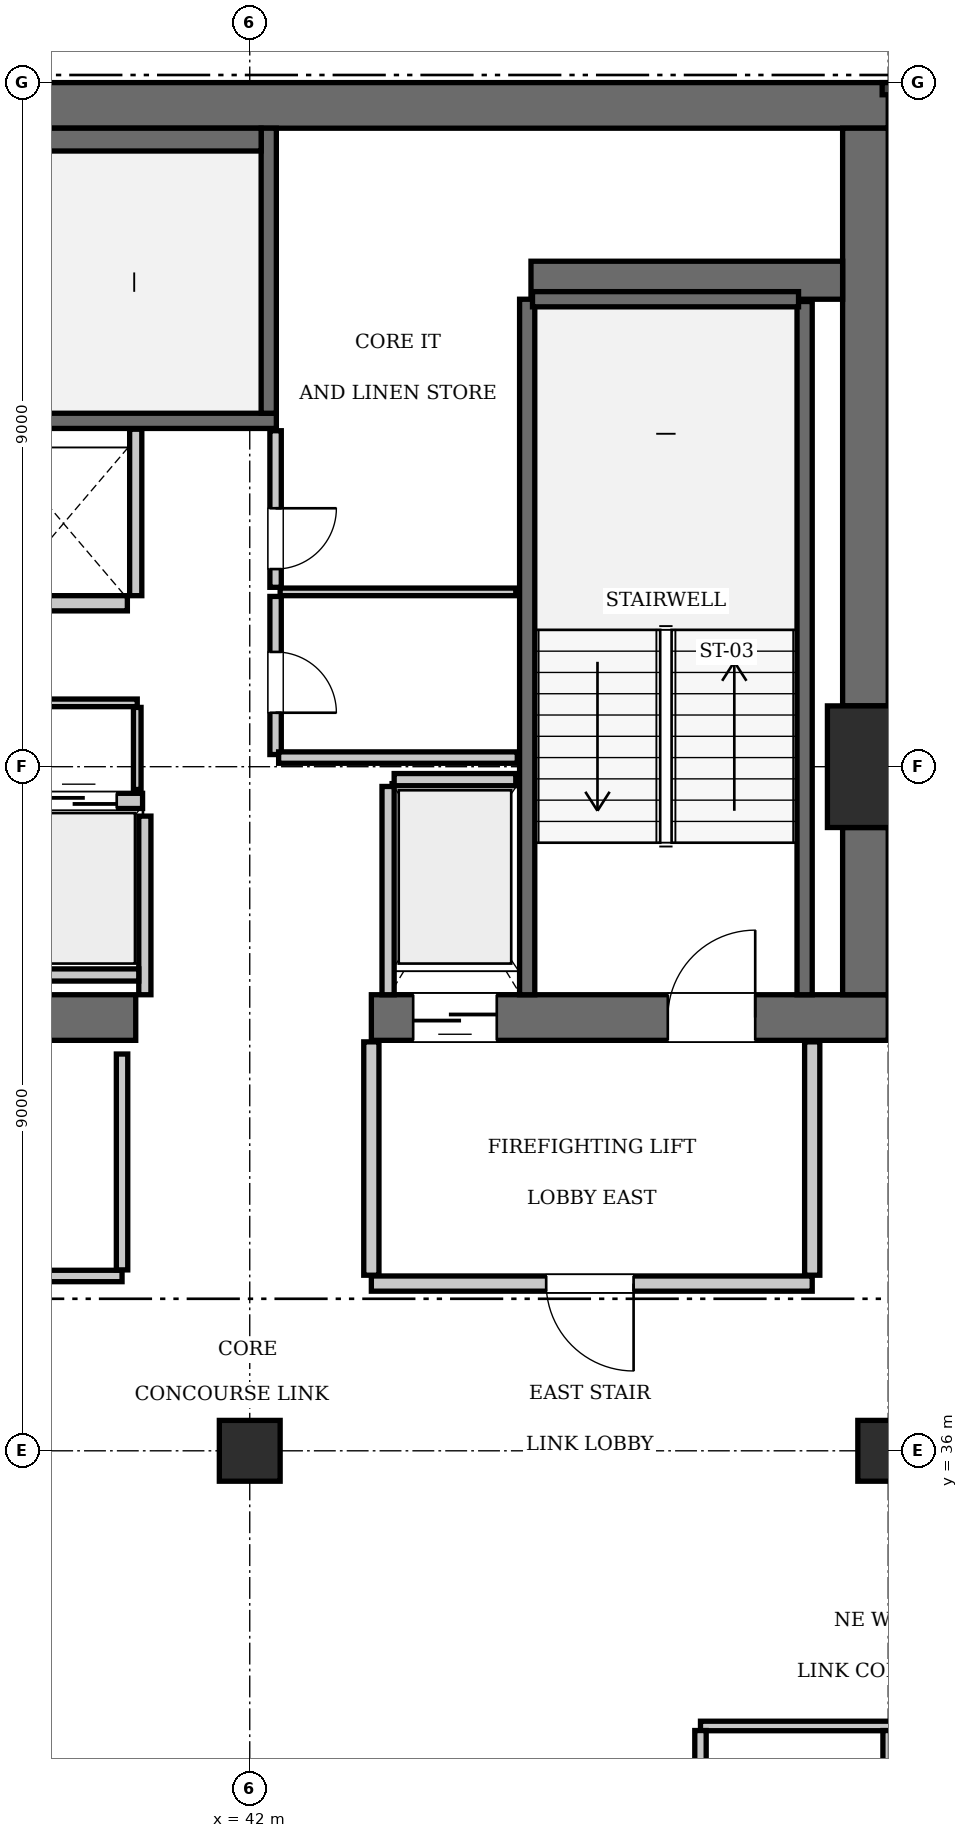
"""IFC4 building model, lengths in metres.
Left out: names, types, materials, properties, quantities, classifications, styles, units other than length and angle.
Written with IfcOpenShell. Run it as: python <this file> out.ifc"""

import sys

from ifc_helpers import new_model, si_unit, direction, frame, frame_2d, origin, origin_2d, place, context, subcontext, project, spatial, rectangle, extrude, element, fill, save


model = new_model("IFC4")
c1 = context("Model", 3, precision=1e-05, world=origin(), true_north=direction((0.0, 1.0)))
c2 = subcontext(c1, "Body", "Model", "MODEL_VIEW")
j1 = project(units=[si_unit("LENGTHUNIT", "METRE"), si_unit("PLANEANGLEUNIT", "RADIAN")], contexts=[c1])
p1 = place(None, origin())
s1 = spatial("IfcSite", under=j1, at=p1, CompositionType="ELEMENT")
p2 = place(p1, origin())
s2 = spatial("IfcBuilding", under=s1, at=p2, CompositionType="ELEMENT")
p3 = place(p2, frame((0.0, 0.0, 247.1)))
s3 = spatial("IfcBuildingStorey", under=s2, at=p3, CompositionType="ELEMENT", Elevation=247.1)
p4 = place(p3, frame((50.4, 45.0, 0.0), z_axis=(0.0, 0.0, 1.0), x_axis=(1.0, 0.0, 0.0)))
e1 = element("IfcColumn", 1, at=p4, inside=s3, PredefinedType="COLUMN", context=c2, shape_type="SweptSolid", body=[
    extrude(rectangle(XDim=1.6, YDim=1.6, at=origin_2d()), origin(), (0.0, 0.0, 1.0), 3.85),
])
p5 = place(p3, frame((25.2, 53.7, 0.0), z_axis=(0.0, 0.0, 1.0), x_axis=(1.0, 0.0, 0.0)))
e2 = element("IfcWall", 2, at=p5, inside=s3, PredefinedType="SHEAR", context=c2, shape_type="SweptSolid", body=[
    extrude(rectangle(XDim=25.2, YDim=0.6, at=frame_2d((12.6, 0.0))), origin(), (0.0, 0.0, 1.0), 3.85),
])
p6 = place(p3, frame((35.1, 41.7, 0.0), z_axis=(0.0, 0.0, 1.0), x_axis=(1.0, 0.0, 0.0)))
e3 = element("IfcWall", 3, at=p6, inside=s3, PredefinedType="SHEAR", context=c2, shape_type="SweptSolid", body=[
    extrude(rectangle(XDim=5.4, YDim=0.6, at=frame_2d((2.7, 0.0))), origin(), (0.0, 0.0, 1.0), 3.85),
])
p7 = place(p3, frame((43.6, 41.7, 0.0), z_axis=(0.0, 0.0, 1.0), x_axis=(1.0, 0.0, 0.0)))
e4 = element("IfcWall", 4, at=p7, inside=s3, PredefinedType="SHEAR", context=c2, shape_type="SweptSolid", body=[
    extrude(rectangle(XDim=6.8, YDim=0.6, at=frame_2d((3.4, 0.0))), origin(), (0.0, 0.0, 1.0), 3.85),
])
p8 = place(p7, frame((3.9, 0.0, 0.0)))
e5 = element("IfcOpeningElement", 5, at=p8, cuts=e4, PredefinedType="OPENING", context=c2, shape_type="SweptSolid", body=[
    extrude(rectangle(XDim=1.15, YDim=2.15, at=frame_2d((0.575, 1.075))), frame((0.0, 0.31, 0.0), z_axis=(0.0, -1.0, 0.0), x_axis=(1.0, 0.0, 0.0)), (0.0, 0.0, 1.0), 0.62),
])
p9 = place(p7, frame((0.55, 0.0, 0.0)))
e6 = element("IfcOpeningElement", 6, at=p9, cuts=e4, PredefinedType="OPENING", context=c2, shape_type="SweptSolid", body=[
    extrude(rectangle(XDim=1.1, YDim=2.2, at=frame_2d((0.55, 1.1))), frame((0.0, 0.31, 0.0), z_axis=(0.0, -1.0, 0.0), x_axis=(1.0, 0.0, 0.0)), (0.0, 0.0, 1.0), 0.62),
])
p10 = place(p3, frame((50.1, 42.0, 0.0), z_axis=(0.0, 0.0, 1.0), x_axis=(0.0, 1.0, 0.0)))
e7 = element("IfcWall", 7, at=p10, inside=s3, PredefinedType="SHEAR", context=c2, shape_type="SweptSolid", body=[
    extrude(rectangle(XDim=2.2, YDim=0.6, at=frame_2d((1.1, 0.0))), origin(), (0.0, 0.0, 1.0), 3.85),
])
p11 = place(p3, frame((50.1, 45.8, 0.0), z_axis=(0.0, 0.0, 1.0), x_axis=(0.0, 1.0, 0.0)))
e8 = element("IfcWall", 8, at=p11, inside=s3, PredefinedType="SHEAR", context=c2, shape_type="SweptSolid", body=[
    extrude(rectangle(XDim=7.6, YDim=0.6, at=frame_2d((3.8, 0.0))), origin(), (0.0, 0.0, 1.0), 3.85),
])
p12 = place(p3, frame((45.7, 51.4, 0.0), z_axis=(0.0, 0.0, 1.0), x_axis=(1.0, 0.0, 0.0)))
e9 = element("IfcWall", 9, at=p12, inside=s3, PredefinedType="SHEAR", context=c2, shape_type="SweptSolid", body=[
    extrude(rectangle(XDim=4.1, YDim=0.5, at=frame_2d((2.05, 0.0))), origin(), (0.0, 0.0, 1.0), 3.85),
])
for number, where, z_axis, x_axis in (
    (10, (42.0, 36.0, 0.0), (0.0, 0.0, 1.0), (1.0, 0.0, 0.0)),
    (11, (50.4, 36.0, 0.0), (0.0, 0.0, 1.0), (1.0, 0.0, 0.0)),
):
    element("IfcColumn", number, at=place(p3, frame(where, z_axis=z_axis, x_axis=x_axis)), inside=s3, PredefinedType="COLUMN", context=c2, shape_type="SweptSolid", body=[
        extrude(rectangle(XDim=0.8, YDim=0.8, at=origin_2d()), origin(), (0.0, 0.0, 1.0), 3.85),
    ])
p13 = place(p3, frame((33.25, 49.55, 0.0), z_axis=(0.0, 0.0, 1.0), x_axis=(1.0, 0.0, 0.0)))
e12 = element("IfcWall", 12, at=p13, inside=s3, PredefinedType="SOLIDWALL", context=c2, shape_type="SweptSolid", body=[
    extrude(rectangle(XDim=9.1, YDim=0.2, at=frame_2d((4.55, 0.0))), origin(), (0.0, 0.0, 1.0), 3.61),
])
p14 = place(p3, frame((42.25, 49.65, 0.0), z_axis=(0.0, 0.0, 1.0), x_axis=(0.0, 1.0, 0.0)))
e13 = element("IfcWall", 13, at=p14, inside=s3, PredefinedType="SOLIDWALL", context=c2, shape_type="SweptSolid", body=[
    extrude(rectangle(XDim=3.75, YDim=0.2, at=frame_2d((1.875, 0.0))), origin(), (0.0, 0.0, 1.0), 3.61),
])
p15 = place(p3, frame((33.45, 53.25, 0.0), z_axis=(0.0, 0.0, 1.0), x_axis=(1.0, 0.0, 0.0)))
e14 = element("IfcWall", 14, at=p15, inside=s3, PredefinedType="SOLIDWALL", context=c2, shape_type="SweptSolid", body=[
    extrude(rectangle(XDim=8.7, YDim=0.3, at=frame_2d((4.35, 0.0))), origin(), (0.0, 0.0, 1.0), 3.61),
])
p16 = place(p3, frame((45.65, 42.0, 0.0), z_axis=(0.0, 0.0, 1.0), x_axis=(0.0, 1.0, 0.0)))
e15 = element("IfcWall", 15, at=p16, inside=s3, PredefinedType="SOLIDWALL", context=c2, shape_type="SweptSolid", body=[
    extrude(rectangle(XDim=9.15, YDim=0.2, at=frame_2d((4.575, 0.0))), origin(), (0.0, 0.0, 1.0), 3.61),
])
p17 = place(p3, frame((49.3, 42.0, 0.0), z_axis=(0.0, 0.0, 1.0), x_axis=(0.0, 1.0, 0.0)))
e16 = element("IfcWall", 16, at=p17, inside=s3, PredefinedType="SOLIDWALL", context=c2, shape_type="SweptSolid", body=[
    extrude(rectangle(XDim=9.12, YDim=0.2, at=frame_2d((4.56, 0.0))), origin(), (0.0, 0.0, 1.0), 3.61),
])
p18 = place(p3, frame((45.72, 51.15, 0.0), z_axis=(0.0, 0.0, 1.0), x_axis=(1.0, 0.0, 0.0)))
e17 = element("IfcWall", 17, at=p18, inside=s3, PredefinedType="SOLIDWALL", context=c2, shape_type="SweptSolid", body=[
    extrude(rectangle(XDim=3.5, YDim=0.2, at=frame_2d((1.75, 0.0))), origin(), (0.0, 0.0, 1.0), 3.61),
])
p19 = place(p3, frame((38.91, 44.55, 0.0), z_axis=(0.0, 0.0, 1.0), x_axis=(1.0, 0.0, 0.0)))
e18 = element("IfcWall", 18, at=p19, inside=s3, PredefinedType="SOLIDWALL", context=c2, shape_type="SweptSolid", body=[
    extrude(rectangle(XDim=1.68, YDim=0.2, at=frame_2d((0.84, 0.0))), origin(), (0.0, 0.0, 1.0), 3.61),
])
p20 = place(p19, frame((0.34, 0.0, 0.0)))
e19 = element("IfcOpeningElement", 19, at=p20, cuts=e18, PredefinedType="OPENING", context=c2, shape_type="SweptSolid", body=[
    extrude(rectangle(XDim=1.0, YDim=2.15, at=frame_2d((0.5, 1.075))), frame((0.0, 0.11, 0.0), z_axis=(0.0, -1.0, 0.0), x_axis=(1.0, 0.0, 0.0)), (0.0, 0.0, 1.0), 0.22),
])
p21 = place(p3, frame((38.71, 47.15, 0.0), z_axis=(0.0, 0.0, 1.0), x_axis=(1.0, 0.0, 0.0)))
e20 = element("IfcWall", 20, at=p21, inside=s3, PredefinedType="SOLIDWALL", context=c2, shape_type="SweptSolid", body=[
    extrude(rectangle(XDim=1.68, YDim=0.2, at=frame_2d((0.84, 0.0))), origin(), (0.0, 0.0, 1.0), 3.61),
])
p22 = place(p3, frame((43.9, 44.83, 0.0), z_axis=(0.0, 0.0, 1.0), x_axis=(1.0, 0.0, 0.0)))
e21 = element("IfcWall", 21, at=p22, inside=s3, PredefinedType="SOLIDWALL", context=c2, shape_type="SweptSolid", body=[
    extrude(rectangle(XDim=1.6, YDim=0.16, at=frame_2d((0.8, 0.0))), origin(), (0.0, 0.0, 1.0), 3.61),
])
p23 = place(p3, frame((43.82, 42.0, 0.0), z_axis=(0.0, 0.0, 1.0), x_axis=(0.0, 1.0, 0.0)))
e22 = element("IfcWall", 22, at=p23, inside=s3, PredefinedType="SOLIDWALL", context=c2, shape_type="SweptSolid", body=[
    extrude(rectangle(XDim=2.74, YDim=0.16, at=frame_2d((1.37, 0.0))), origin(), (0.0, 0.0, 1.0), 3.61),
])
p24 = place(p3, frame((40.62, 42.0, 0.0), z_axis=(0.0, 0.0, 1.0), x_axis=(0.0, 1.0, 0.0)))
e23 = element("IfcWall", 23, at=p24, inside=s3, PredefinedType="SOLIDWALL", context=c2, shape_type="SweptSolid", body=[
    extrude(rectangle(XDim=2.35, YDim=0.16, at=frame_2d((1.175, 0.0))), origin(), (0.0, 0.0, 1.0), 3.61),
])
p25 = place(p3, frame((35.52, 42.26, 0.0), z_axis=(0.0, 0.0, 1.0), x_axis=(1.0, 0.0, 0.0)))
e24 = element("IfcWall", 24, at=p25, inside=s3, PredefinedType="SOLIDWALL", context=c2, shape_type="SweptSolid", body=[
    extrude(rectangle(XDim=5.02, YDim=0.16, at=frame_2d((2.51, 0.0))), origin(), (0.0, 0.0, 1.0), 3.61),
])
p26 = place(p3, frame((40.5, 47.25, 0.0), z_axis=(0.0, 0.0, 1.0), x_axis=(0.0, 1.0, 0.0)))
e25 = element("IfcWall", 25, at=p26, inside=s3, PredefinedType="SOLIDWALL", context=c2, shape_type="SweptSolid", body=[
    extrude(rectangle(XDim=2.19, YDim=0.16, at=frame_2d((1.095, 0.0))), origin(), (0.0, 0.0, 1.0), 3.61),
])
p27 = place(p3, frame((43.6, 38.2, 0.0), z_axis=(0.0, 0.0, 1.0), x_axis=(1.0, 0.0, 0.0)))
e26 = element("IfcWall", 26, at=p27, inside=s3, PredefinedType="PARTITIONING", context=c2, shape_type="SweptSolid", body=[
    extrude(rectangle(XDim=5.8, YDim=0.2, at=frame_2d((2.9, 0.0))), origin(), (0.0, 0.0, 1.0), 3.61),
])
p28 = place(p27, frame((2.3, 0.0, 0.0)))
e27 = element("IfcOpeningElement", 27, at=p28, cuts=e26, PredefinedType="OPENING", context=c2, shape_type="SweptSolid", body=[
    extrude(rectangle(XDim=1.15, YDim=2.15, at=frame_2d((0.575, 1.075))), frame((0.0, 0.11, 0.0), z_axis=(0.0, -1.0, 0.0), x_axis=(1.0, 0.0, 0.0)), (0.0, 0.0, 1.0), 0.22),
])
for number, where, z_axis, x_axis in (
    (28, (43.6, 38.31, 0.0), (0.0, 0.0, 1.0), (0.0, 1.0, 0.0)),
    (29, (49.4, 38.31, 0.0), (0.0, 0.0, 1.0), (0.0, 1.0, 0.0)),
):
    element("IfcWall", number, at=place(p3, frame(where, z_axis=z_axis, x_axis=x_axis)), inside=s3, PredefinedType="PARTITIONING", context=c2, shape_type="SweptSolid", body=[
        extrude(rectangle(XDim=3.07, YDim=0.2, at=frame_2d((1.535, 0.0))), origin(), (0.0, 0.0, 1.0), 3.61),
    ])
p29 = place(p3, frame((35.58, 45.84, 0.0), z_axis=(0.0, 0.0, 1.0), x_axis=(1.0, 0.0, 0.0)))
e30 = element("IfcWall", 30, at=p29, inside=s3, PredefinedType="PARTITIONING", context=c2, shape_type="SweptSolid", body=[
    extrude(rectangle(XDim=4.94, YDim=0.1, at=frame_2d((2.47, 0.0))), origin(), (0.0, 0.0, 1.0), 3.61),
])
p30 = place(p29, frame((1.8, 0.0, 0.0)))
e31 = element("IfcOpeningElement", 31, at=p30, cuts=e30, PredefinedType="OPENING", context=c2, shape_type="SweptSolid", body=[
    extrude(rectangle(XDim=0.8, YDim=2.05, at=frame_2d((0.4, 1.025))), frame((0.0, 0.06, 0.0), z_axis=(0.0, -1.0, 0.0), x_axis=(1.0, 0.0, 0.0)), (0.0, 0.0, 1.0), 0.12),
])
p31 = place(p3, frame((40.52, 44.7, 0.0), z_axis=(0.0, 0.0, 1.0), x_axis=(0.0, 1.0, 0.0)))
e32 = element("IfcWall", 32, at=p31, inside=s3, PredefinedType="PARTITIONING", context=c2, shape_type="SweptSolid", body=[
    extrude(rectangle(XDim=1.08, YDim=0.1, at=frame_2d((0.54, 0.0))), origin(), (0.0, 0.0, 1.0), 3.61),
])
p32 = place(p3, frame((42.34, 45.16, 0.0), z_axis=(0.0, 0.0, 1.0), x_axis=(0.0, 1.0, 0.0)))
e33 = element("IfcWall", 33, at=p32, inside=s3, PredefinedType="PARTITIONING", context=c2, shape_type="SweptSolid", body=[
    extrude(rectangle(XDim=2.08, YDim=0.15, at=frame_2d((1.04, 0.0))), origin(), (0.0, 0.0, 1.0), 3.61),
])
p33 = place(p32, frame((0.55, 0.0, 0.0)))
e34 = element("IfcOpeningElement", 34, at=p33, cuts=e33, PredefinedType="OPENING", context=c2, shape_type="SweptSolid", body=[
    extrude(rectangle(XDim=0.8, YDim=2.05, at=frame_2d((0.4, 1.025))), frame((0.0, 0.085, 0.0), z_axis=(0.0, -1.0, 0.0), x_axis=(1.0, 0.0, 0.0)), (0.0, 0.0, 1.0), 0.17),
])
p34 = place(p3, frame((42.34, 47.36, 0.0), z_axis=(0.0, 0.0, 1.0), x_axis=(0.0, 1.0, 0.0)))
e35 = element("IfcWall", 35, at=p34, inside=s3, PredefinedType="PARTITIONING", context=c2, shape_type="SweptSolid", body=[
    extrude(rectangle(XDim=2.06, YDim=0.15, at=frame_2d((1.03, 0.0))), origin(), (0.0, 0.0, 1.0), 3.61),
])
p35 = place(p34, frame((0.24, 0.0, 0.0)))
e36 = element("IfcOpeningElement", 36, at=p35, cuts=e35, PredefinedType="OPENING", context=c2, shape_type="SweptSolid", body=[
    extrude(rectangle(XDim=0.8, YDim=2.05, at=frame_2d((0.4, 1.025))), frame((0.0, 0.085, 0.0), z_axis=(0.0, -1.0, 0.0), x_axis=(1.0, 0.0, 0.0)), (0.0, 0.0, 1.0), 0.17),
])
p36 = place(p3, frame((42.4, 47.3, 0.0), z_axis=(0.0, 0.0, 1.0), x_axis=(1.0, 0.0, 0.0)))
e37 = element("IfcWall", 37, at=p36, inside=s3, PredefinedType="PARTITIONING", context=c2, shape_type="SweptSolid", body=[
    extrude(rectangle(XDim=3.1, YDim=0.1, at=frame_2d((1.55, 0.0))), origin(), (0.0, 0.0, 1.0), 3.61),
])
p37 = place(p3, frame((42.38, 45.12, 0.0), z_axis=(0.0, 0.0, 1.0), x_axis=(1.0, 0.0, 0.0)))
e38 = element("IfcWall", 38, at=p37, inside=s3, PredefinedType="PARTITIONING", context=c2, shape_type="SweptSolid", body=[
    extrude(rectangle(XDim=3.14, YDim=0.15, at=frame_2d((1.57, 0.0))), origin(), (0.0, 0.0, 1.0), 3.61),
])
p38 = place(p3, frame((34.4, 38.3, 0.0), z_axis=(0.0, 0.0, 1.0), x_axis=(1.0, 0.0, 0.0)))
e39 = element("IfcWall", 39, at=p38, inside=s3, PredefinedType="PARTITIONING", context=c2, shape_type="SweptSolid", body=[
    extrude(rectangle(XDim=5.92, YDim=0.15, at=frame_2d((2.96, 0.0))), origin(), (0.0, 0.0, 1.0), 3.61),
])
p39 = place(p38, frame((2.4, 0.0, 0.0)))
e40 = element("IfcOpeningElement", 40, at=p39, cuts=e39, PredefinedType="OPENING", context=c2, shape_type="SweptSolid", body=[
    extrude(rectangle(XDim=0.9, YDim=2.1, at=frame_2d((0.45, 1.05))), frame((0.0, 0.085, 0.0), z_axis=(0.0, -1.0, 0.0), x_axis=(1.0, 0.0, 0.0)), (0.0, 0.0, 1.0), 0.17),
])
p40 = place(p3, frame((40.32, 38.38, 0.0), z_axis=(0.0, 0.0, 1.0), x_axis=(0.0, 1.0, 0.0)))
e41 = element("IfcWall", 41, at=p40, inside=s3, PredefinedType="PARTITIONING", context=c2, shape_type="SweptSolid", body=[
    extrude(rectangle(XDim=2.84, YDim=0.15, at=frame_2d((1.42, 0.0))), origin(), (0.0, 0.0, 1.0), 3.61),
])
p41 = place(p3, frame((47.93, 32.38, 0.0), z_axis=(0.0, 0.0, 1.0), x_axis=(1.0, 0.0, 0.0)))
e42 = element("IfcWall", 42, at=p41, inside=s3, PredefinedType="PARTITIONING", context=c2, shape_type="SweptSolid", body=[
    extrude(rectangle(XDim=12.17, YDim=0.125, at=frame_2d((6.085, 0.0))), origin(), (0.0, 0.0, 1.0), 3.61),
])
p42 = place(p3, frame((47.93, 30.35, 0.0), z_axis=(0.0, 0.0, 1.0), x_axis=(0.0, 1.0, 0.0)))
e43 = element("IfcWall", 43, at=p42, inside=s3, PredefinedType="PARTITIONING", context=c2, shape_type="SweptSolid", body=[
    extrude(rectangle(XDim=1.97, YDim=0.15, at=frame_2d((0.985, 0.0))), origin(), (0.0, 0.0, 1.0), 3.61),
])
p43 = place(p3, frame((50.38, 30.35, 0.0), z_axis=(0.0, 0.0, 1.0), x_axis=(0.0, 1.0, 0.0)))
e44 = element("IfcWall", 44, at=p43, inside=s3, PredefinedType="PARTITIONING", context=c2, shape_type="SweptSolid", body=[
    extrude(rectangle(XDim=1.97, YDim=0.1, at=frame_2d((0.985, 0.0))), origin(), (0.0, 0.0, 1.0), 3.077),
])
p44 = place(p8, origin())
e45 = element("IfcDoor", 45, at=p44, inside=s3, OperationType="SINGLE_SWING_RIGHT", PredefinedType="DOOR", context=c2, shape_type="SweptSolid", body=[
    extrude(rectangle(XDim=1.15, YDim=2.15, at=frame_2d((0.575, 1.075))), frame((0.0, 0.025, 0.0), z_axis=(0.0, -1.0, 0.0), x_axis=(1.0, 0.0, 0.0)), (0.0, 0.0, 1.0), 0.05),
])
fill(e5, e45)
p45 = place(p20, origin())
e46 = element("IfcDoor", 46, at=p45, inside=s3, OperationType="SLIDING_TO_LEFT", PredefinedType="DOOR", context=c2, shape_type="SweptSolid", body=[
    extrude(rectangle(XDim=1.0, YDim=2.15, at=frame_2d((0.5, 1.075))), frame((0.0, 0.025, 0.0), z_axis=(0.0, -1.0, 0.0), x_axis=(1.0, 0.0, 0.0)), (0.0, 0.0, 1.0), 0.05),
])
fill(e19, e46)
p46 = place(p9, frame((1.1, 0.0, 0.0), z_axis=(0.0, 0.0, 1.0), x_axis=(-1.0, 0.0, 0.0)))
e47 = element("IfcDoor", 47, at=p46, inside=s3, OperationType="SLIDING_TO_LEFT", PredefinedType="DOOR", context=c2, shape_type="SweptSolid", body=[
    extrude(rectangle(XDim=1.1, YDim=2.2, at=frame_2d((0.55, 1.1))), frame((0.0, 0.025, 0.0), z_axis=(0.0, -1.0, 0.0), x_axis=(1.0, 0.0, 0.0)), (0.0, 0.0, 1.0), 0.05),
])
fill(e6, e47)
p47 = place(p28, frame((1.15, 0.0, 0.0), z_axis=(0.0, 0.0, 1.0), x_axis=(-1.0, 0.0, 0.0)))
e48 = element("IfcDoor", 48, at=p47, inside=s3, OperationType="SINGLE_SWING_LEFT", PredefinedType="DOOR", context=c2, shape_type="SweptSolid", body=[
    extrude(rectangle(XDim=1.15, YDim=2.15, at=frame_2d((0.575, 1.075))), frame((0.0, 0.025, 0.0), z_axis=(0.0, -1.0, 0.0), x_axis=(1.0, 0.0, 0.0)), (0.0, 0.0, 1.0), 0.05),
])
fill(e27, e48)
p48 = place(p33, frame((0.8, 0.0, 0.0), z_axis=(0.0, 0.0, 1.0), x_axis=(-1.0, 0.0, 0.0)))
e49 = element("IfcDoor", 49, at=p48, inside=s3, OperationType="SINGLE_SWING_RIGHT", PredefinedType="DOOR", context=c2, shape_type="SweptSolid", body=[
    extrude(rectangle(XDim=0.8, YDim=2.05, at=frame_2d((0.4, 1.025))), frame((0.0, 0.025, 0.0), z_axis=(0.0, -1.0, 0.0), x_axis=(1.0, 0.0, 0.0)), (0.0, 0.0, 1.0), 0.05),
])
fill(e34, e49)
p49 = place(p35, frame((0.8, 0.0, 0.0), z_axis=(0.0, 0.0, 1.0), x_axis=(-1.0, 0.0, 0.0)))
e50 = element("IfcDoor", 50, at=p49, inside=s3, OperationType="SINGLE_SWING_LEFT", PredefinedType="DOOR", context=c2, shape_type="SweptSolid", body=[
    extrude(rectangle(XDim=0.8, YDim=2.05, at=frame_2d((0.4, 1.025))), frame((0.0, 0.025, 0.0), z_axis=(0.0, -1.0, 0.0), x_axis=(1.0, 0.0, 0.0)), (0.0, 0.0, 1.0), 0.05),
])
fill(e36, e50)
save(model, sys.argv[1])
